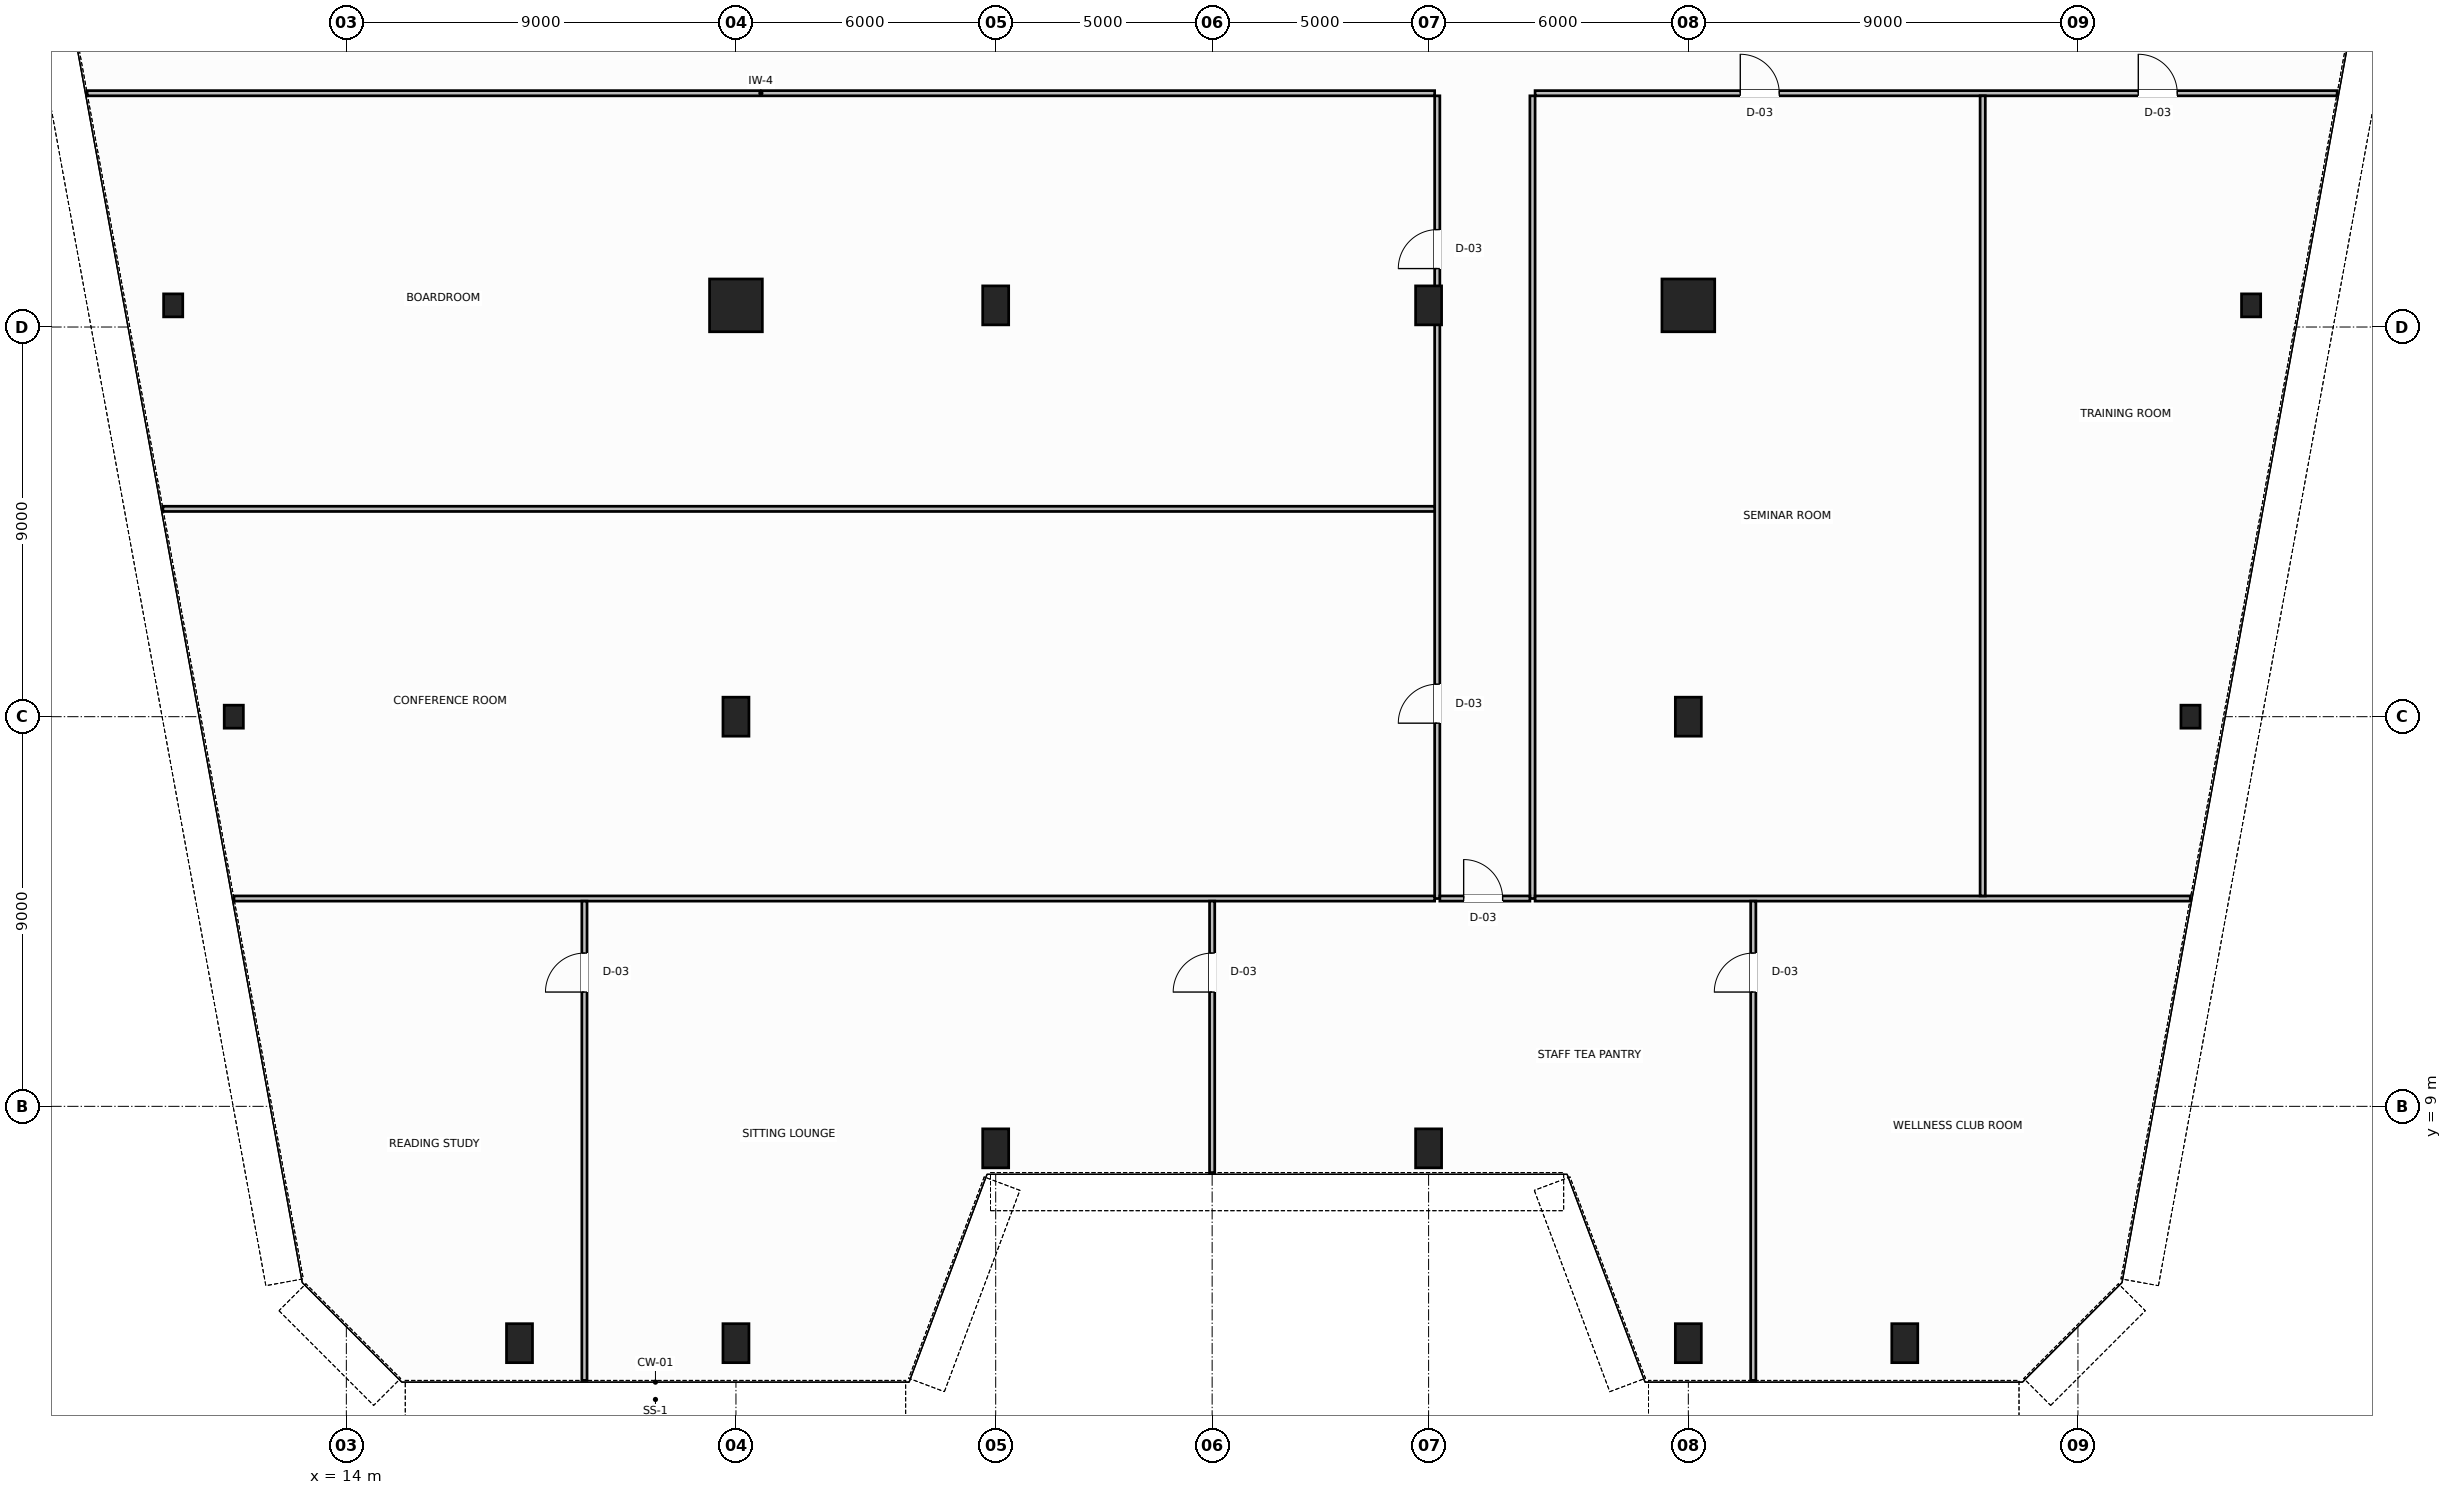
"""IFC4 building model, lengths in metres.
Left out: names, types, materials, properties, quantities, classifications, styles, units other than length and angle.
Written with IfcOpenShell. Run it as: python <this file> out.ifc"""

import sys

from ifc_helpers import new_model, si_unit, direction, frame, frame_2d, origin, origin_2d, place, context, subcontext, project, spatial, rectangle, hollow_rectangle, hollow_circle, i_section, extrude, source, transform, mapped, element, fill, save


model = new_model("IFC4")
c1 = context("Model", 3, precision=1e-05, world=origin(), true_north=direction((0.0, 1.0)))
c2 = subcontext(c1, "Body", "Model", "MODEL_VIEW")
j1 = project(units=[si_unit("LENGTHUNIT", "METRE"), si_unit("PLANEANGLEUNIT", "RADIAN")], contexts=[c1])
p1 = place(None, origin())
s1 = spatial("IfcSite", under=j1, at=p1, CompositionType="ELEMENT")
p2 = place(p1, origin())
s2 = spatial("IfcBuilding", under=s1, at=p2, CompositionType="ELEMENT")
p3 = place(p2, frame((0.0, 0.0, 60.6)))
s3 = spatial("IfcBuildingStorey", under=s2, at=p3, CompositionType="ELEMENT", Elevation=60.6)
m1 = source(origin(), c2, "Body", "SweptSolid", [
    extrude(i_section(OverallWidth=0.442, OverallDepth=0.531, WebThickness=0.065, FlangeThickness=0.076, FilletRadius=0.015, at=origin_2d()), origin(), (0.0, 0.0, 1.0), 3.8),
])
for number, where, z_axis, x_axis in (
    (1, (10.0, 27.5, 0.0), (0.0, 0.0, 1.0), (1.0, 0.0, 0.0)),
    (2, (11.4, 18.0, 0.0), (0.0, 0.0, 1.0), (1.0, 0.0, 0.0)),
    (3, (58.0, 27.5, 0.0), (0.0, 0.0, 1.0), (1.0, 0.0, 0.0)),
    (4, (56.6, 18.0, 0.0), (0.0, 0.0, 1.0), (1.0, 0.0, 0.0)),
):
    element("IfcColumn", number, at=place(p3, frame(where, z_axis=z_axis, x_axis=x_axis)), inside=s3, PredefinedType="COLUMN", context=c2, shape_type="MappedRepresentation", body=[
        mapped(m1, transform((0.0, 0.0, 0.0), scale=1.0)),
    ])
m2 = source(origin(), c2, "Body", "SweptSolid", [
    extrude(hollow_circle(Radius=0.61, WallThickness=0.05, at=origin_2d()), origin(), (0.0, 0.0, 1.0), 3.8),
])
p4 = place(p3, frame((23.0, 27.5, 0.0), z_axis=(0.0, 0.0, 1.0), x_axis=(1.0, 0.0, 0.0)))
e5 = element("IfcColumn", 5, at=p4, inside=s3, PredefinedType="COLUMN", context=c2, shape_type="MappedRepresentation", body=[
    mapped(m2, transform((0.0, 0.0, 0.0), scale=1.0)),
])
m3 = source(origin(), c2, "Body", "SweptSolid", [
    extrude(hollow_rectangle(XDim=0.6, YDim=0.9, WallThickness=0.04, InnerFilletRadius=0.04, OuterFilletRadius=0.08, at=origin_2d()), origin(), (0.0, 0.0, 1.0), 3.8),
])
for number, where, z_axis, x_axis in (
    (6, (29.0, 27.5, 0.0), (0.0, 0.0, 1.0), (1.0, 0.0, 0.0)),
    (7, (39.0, 27.5, 0.0), (0.0, 0.0, 1.0), (1.0, 0.0, 0.0)),
):
    element("IfcColumn", number, at=place(p3, frame(where, z_axis=z_axis, x_axis=x_axis)), inside=s3, PredefinedType="COLUMN", context=c2, shape_type="MappedRepresentation", body=[
        mapped(m3, transform((0.0, 0.0, 0.0), scale=1.0)),
    ])
p5 = place(p3, frame((45.0, 27.5, 0.0), z_axis=(0.0, 0.0, 1.0), x_axis=(1.0, 0.0, 0.0)))
e8 = element("IfcColumn", 8, at=p5, inside=s3, PredefinedType="COLUMN", context=c2, shape_type="MappedRepresentation", body=[
    mapped(m2, transform((0.0, 0.0, 0.0), scale=1.0)),
])
for number, where, z_axis, x_axis in (
    (9, (23.0, 18.0, 0.0), (0.0, 0.0, 1.0), (1.0, 0.0, 0.0)),
    (10, (45.0, 18.0, 0.0), (0.0, 0.0, 1.0), (1.0, 0.0, 0.0)),
):
    element("IfcColumn", number, at=place(p3, frame(where, z_axis=z_axis, x_axis=x_axis)), inside=s3, PredefinedType="COLUMN", context=c2, shape_type="MappedRepresentation", body=[
        mapped(m3, transform((0.0, 0.0, 0.0), scale=1.0)),
    ])
m4 = source(origin(), c2, "Body", "SweptSolid", [
    extrude(hollow_rectangle(XDim=0.6, YDim=0.9, WallThickness=0.04, InnerFilletRadius=0.04, OuterFilletRadius=0.08, at=origin_2d()), origin(), (0.0, 0.0, 1.0), 3.743),
])
for number, where, z_axis, x_axis in (
    (11, (18.0, 3.53, 0.032), (0.0, 0.064, 0.998), (-1.0, 0.0, 0.0)),
    (12, (23.0, 3.53, 0.032), (0.0, 0.064, 0.998), (-1.0, 0.0, 0.0)),
    (13, (29.0, 8.03, 0.032), (0.0, 0.064, 0.998), (-1.0, 0.0, 0.0)),
    (14, (39.0, 8.03, 0.032), (0.0, 0.064, 0.998), (-1.0, 0.0, 0.0)),
    (15, (45.0, 3.53, 0.032), (0.0, 0.064, 0.998), (-1.0, 0.0, 0.0)),
    (16, (50.0, 3.53, 0.032), (0.0, 0.064, 0.998), (-1.0, 0.0, 0.0)),
):
    element("IfcColumn", number, at=place(p3, frame(where, z_axis=z_axis, x_axis=x_axis)), inside=s3, PredefinedType="COLUMN", context=c2, shape_type="MappedRepresentation", body=[
        mapped(m4, transform((0.0, 0.0, 0.0), scale=1.0)),
    ])
p6 = place(p3, frame((8.012, 32.4, 0.0), z_axis=(0.0, 0.0, 1.0), x_axis=(1.0, 0.0, 0.0)))
e17 = element("IfcWall", 17, at=p6, inside=s3, PredefinedType="PARTITIONING", context=c2, shape_type="SweptSolid", body=[
    extrude(rectangle(XDim=31.128, YDim=0.12, at=frame_2d((15.564, 0.0))), origin(), (0.0, 0.0, 1.0), 3.58),
])
p7 = place(p3, frame((41.46, 32.4, 0.0), z_axis=(0.0, 0.0, 1.0), x_axis=(1.0, 0.0, 0.0)))
e18 = element("IfcWall", 18, at=p7, inside=s3, PredefinedType="PARTITIONING", context=c2, shape_type="SweptSolid", body=[
    extrude(rectangle(XDim=18.528, YDim=0.12, at=frame_2d((9.264, 0.0))), origin(), (0.0, 0.0, 1.0), 3.58),
])
p8 = place(p7, frame((4.74, 0.0, 0.0)))
e19 = element("IfcOpeningElement", 19, at=p8, cuts=e18, PredefinedType="OPENING", context=c2, shape_type="SweptSolid", body=[
    extrude(rectangle(XDim=0.9, YDim=2.15, at=frame_2d((0.45, 1.075))), frame((0.0, 0.07, 0.0), z_axis=(0.0, -1.0, 0.0), x_axis=(1.0, 0.0, 0.0)), (0.0, 0.0, 1.0), 0.14),
])
p9 = place(p7, frame((13.934, 0.0, 0.0)))
e20 = element("IfcOpeningElement", 20, at=p9, cuts=e18, PredefinedType="OPENING", context=c2, shape_type="SweptSolid", body=[
    extrude(rectangle(XDim=0.9, YDim=2.15, at=frame_2d((0.45, 1.075))), frame((0.0, 0.07, 0.0), z_axis=(0.0, -1.0, 0.0), x_axis=(1.0, 0.0, 0.0)), (0.0, 0.0, 1.0), 0.14),
])
p10 = place(p3, frame((39.2, 13.8, 0.0), z_axis=(0.0, 0.0, 1.0), x_axis=(0.0, 1.0, 0.0)))
e21 = element("IfcWall", 21, at=p10, inside=s3, PredefinedType="PARTITIONING", context=c2, shape_type="SweptSolid", body=[
    extrude(rectangle(XDim=18.54, YDim=0.12, at=frame_2d((9.27, 0.0))), origin(), (0.0, 0.0, 1.0), 2.77),
])
p11 = place(p10, frame((4.05, 0.0, 0.0)))
e22 = element("IfcOpeningElement", 22, at=p11, cuts=e21, PredefinedType="OPENING", context=c2, shape_type="SweptSolid", body=[
    extrude(rectangle(XDim=0.9, YDim=2.15, at=frame_2d((0.45, 1.075))), frame((0.0, 0.07, 0.0), z_axis=(0.0, -1.0, 0.0), x_axis=(1.0, 0.0, 0.0)), (0.0, 0.0, 1.0), 0.14),
])
p12 = place(p10, frame((14.55, 0.0, 0.0)))
e23 = element("IfcOpeningElement", 23, at=p12, cuts=e21, PredefinedType="OPENING", context=c2, shape_type="SweptSolid", body=[
    extrude(rectangle(XDim=0.9, YDim=2.15, at=frame_2d((0.45, 1.075))), frame((0.0, 0.07, 0.0), z_axis=(0.0, -1.0, 0.0), x_axis=(1.0, 0.0, 0.0)), (0.0, 0.0, 1.0), 0.14),
])
p13 = place(p3, frame((41.4, 13.8, 0.0), z_axis=(0.0, 0.0, 1.0), x_axis=(0.0, 1.0, 0.0)))
e24 = element("IfcWall", 24, at=p13, inside=s3, PredefinedType="PARTITIONING", context=c2, shape_type="SweptSolid", body=[
    extrude(rectangle(XDim=18.54, YDim=0.12, at=frame_2d((9.27, 0.0))), origin(), (0.0, 0.0, 1.0), 3.58),
])
p14 = place(p3, frame((39.26, 13.8, 0.0), z_axis=(0.0, 0.0, 1.0), x_axis=(1.0, 0.0, 0.0)))
e25 = element("IfcWall", 25, at=p14, inside=s3, PredefinedType="PARTITIONING", context=c2, shape_type="SweptSolid", body=[
    extrude(rectangle(XDim=2.08, YDim=0.12, at=frame_2d((1.04, 0.0))), origin(), (0.0, 0.0, 1.0), 3.58),
])
p15 = place(p14, frame((0.55, 0.0, 0.0)))
e26 = element("IfcOpeningElement", 26, at=p15, cuts=e25, PredefinedType="OPENING", context=c2, shape_type="SweptSolid", body=[
    extrude(rectangle(XDim=0.9, YDim=2.15, at=frame_2d((0.45, 1.075))), frame((0.0, 0.07, 0.0), z_axis=(0.0, -1.0, 0.0), x_axis=(1.0, 0.0, 0.0)), (0.0, 0.0, 1.0), 0.14),
])
p16 = place(p3, frame((11.404, 13.8, 0.0), z_axis=(0.0, 0.0, 1.0), x_axis=(1.0, 0.0, 0.0)))
e27 = element("IfcWall", 27, at=p16, inside=s3, PredefinedType="PARTITIONING", context=c2, shape_type="SweptSolid", body=[
    extrude(rectangle(XDim=27.736, YDim=0.12, at=frame_2d((13.868, 0.0))), origin(), (0.0, 0.0, 1.0), 3.58),
])
p17 = place(p3, frame((41.46, 13.8, 0.0), z_axis=(0.0, 0.0, 1.0), x_axis=(1.0, 0.0, 0.0)))
e28 = element("IfcWall", 28, at=p17, inside=s3, PredefinedType="PARTITIONING", context=c2, shape_type="SweptSolid", body=[
    extrude(rectangle(XDim=15.136, YDim=0.12, at=frame_2d((7.568, 0.0))), origin(), (0.0, 0.0, 1.0), 3.58),
])
p18 = place(p3, frame((19.5, 2.67, 0.0), z_axis=(0.0, 0.0, 1.0), x_axis=(0.0, 1.0, 0.0)))
e29 = element("IfcWall", 29, at=p18, inside=s3, PredefinedType="PARTITIONING", context=c2, shape_type="SweptSolid", body=[
    extrude(rectangle(XDim=11.07, YDim=0.12, at=frame_2d((5.535, 0.0))), origin(), (0.0, 0.0, 1.0), 3.58),
])
p19 = place(p18, frame((8.97, 0.0, 0.0)))
e30 = element("IfcOpeningElement", 30, at=p19, cuts=e29, PredefinedType="OPENING", context=c2, shape_type="SweptSolid", body=[
    extrude(rectangle(XDim=0.9, YDim=2.15, at=frame_2d((0.45, 1.075))), frame((0.0, 0.07, 0.0), z_axis=(0.0, -1.0, 0.0), x_axis=(1.0, 0.0, 0.0)), (0.0, 0.0, 1.0), 0.14),
])
p20 = place(p3, frame((34.0, 7.47, 0.0), z_axis=(0.0, 0.0, 1.0), x_axis=(0.0, 1.0, 0.0)))
e31 = element("IfcWall", 31, at=p20, inside=s3, PredefinedType="PARTITIONING", context=c2, shape_type="SweptSolid", body=[
    extrude(rectangle(XDim=6.27, YDim=0.12, at=frame_2d((3.135, 0.0))), origin(), (0.0, 0.0, 1.0), 3.58),
])
p21 = place(p20, frame((4.17, 0.0, 0.0)))
e32 = element("IfcOpeningElement", 32, at=p21, cuts=e31, PredefinedType="OPENING", context=c2, shape_type="SweptSolid", body=[
    extrude(rectangle(XDim=0.9, YDim=2.15, at=frame_2d((0.45, 1.075))), frame((0.0, 0.07, 0.0), z_axis=(0.0, -1.0, 0.0), x_axis=(1.0, 0.0, 0.0)), (0.0, 0.0, 1.0), 0.14),
])
p22 = place(p3, frame((46.5, 2.67, 0.0), z_axis=(0.0, 0.0, 1.0), x_axis=(0.0, 1.0, 0.0)))
e33 = element("IfcWall", 33, at=p22, inside=s3, PredefinedType="PARTITIONING", context=c2, shape_type="SweptSolid", body=[
    extrude(rectangle(XDim=11.07, YDim=0.12, at=frame_2d((5.535, 0.0))), origin(), (0.0, 0.0, 1.0), 3.58),
])
p23 = place(p22, frame((8.97, 0.0, 0.0)))
e34 = element("IfcOpeningElement", 34, at=p23, cuts=e33, PredefinedType="OPENING", context=c2, shape_type="SweptSolid", body=[
    extrude(rectangle(XDim=0.9, YDim=2.15, at=frame_2d((0.45, 1.075))), frame((0.0, 0.07, 0.0), z_axis=(0.0, -1.0, 0.0), x_axis=(1.0, 0.0, 0.0)), (0.0, 0.0, 1.0), 0.14),
])
p24 = place(p3, frame((9.763, 22.8, 0.0), z_axis=(0.0, 0.0, 1.0), x_axis=(1.0, 0.0, 0.0)))
e35 = element("IfcWall", 35, at=p24, inside=s3, PredefinedType="PARTITIONING", context=c2, shape_type="SweptSolid", body=[
    extrude(rectangle(XDim=29.377, YDim=0.12, at=frame_2d((14.688, 0.0))), origin(), (0.0, 0.0, 1.0), 3.58),
])
p25 = place(p3, frame((51.8, 13.86, 0.0), z_axis=(0.0, 0.0, 1.0), x_axis=(0.0, 1.0, 0.0)))
e36 = element("IfcWall", 36, at=p25, inside=s3, PredefinedType="PARTITIONING", context=c2, shape_type="SweptSolid", body=[
    extrude(rectangle(XDim=18.48, YDim=0.12, at=frame_2d((9.24, 0.0))), origin(), (0.0, 0.0, 1.0), 3.58),
])
m5 = source(origin(), c2, "Body", "SweptSolid", [
    extrude(rectangle(XDim=0.9, YDim=2.15, at=frame_2d((0.45, 1.075))), frame((0.0, 0.025, 0.0), z_axis=(0.0, -1.0, 0.0), x_axis=(1.0, 0.0, 0.0)), (0.0, 0.0, 1.0), 0.05),
])
p26 = place(p19, origin())
e37 = element("IfcDoor", 37, at=p26, inside=s3, OperationType="SINGLE_SWING_RIGHT", PredefinedType="DOOR", context=c2, shape_type="MappedRepresentation", body=[
    mapped(m5, transform((0.0, 0.0, 0.0), scale=1.0)),
])
fill(e30, e37)
p27 = place(p21, origin())
e38 = element("IfcDoor", 38, at=p27, inside=s3, OperationType="SINGLE_SWING_LEFT", PredefinedType="DOOR", context=c2, shape_type="MappedRepresentation", body=[
    mapped(m5, transform((0.0, 0.0, 0.0), scale=1.0)),
])
fill(e32, e38)
p28 = place(p15, origin())
e39 = element("IfcDoor", 39, at=p28, inside=s3, OperationType="SINGLE_SWING_LEFT", PredefinedType="DOOR", context=c2, shape_type="MappedRepresentation", body=[
    mapped(m5, transform((0.0, 0.0, 0.0), scale=1.0)),
])
fill(e26, e39)
p29 = place(p23, origin())
e40 = element("IfcDoor", 40, at=p29, inside=s3, OperationType="SINGLE_SWING_RIGHT", PredefinedType="DOOR", context=c2, shape_type="MappedRepresentation", body=[
    mapped(m5, transform((0.0, 0.0, 0.0), scale=1.0)),
])
fill(e34, e40)
p30 = place(p11, origin())
e41 = element("IfcDoor", 41, at=p30, inside=s3, OperationType="SINGLE_SWING_LEFT", PredefinedType="DOOR", context=c2, shape_type="MappedRepresentation", body=[
    mapped(m5, transform((0.0, 0.0, 0.0), scale=1.0)),
])
fill(e22, e41)
p31 = place(p12, origin())
e42 = element("IfcDoor", 42, at=p31, inside=s3, OperationType="SINGLE_SWING_RIGHT", PredefinedType="DOOR", context=c2, shape_type="MappedRepresentation", body=[
    mapped(m5, transform((0.0, 0.0, 0.0), scale=1.0)),
])
fill(e23, e42)
p32 = place(p8, origin())
e43 = element("IfcDoor", 43, at=p32, inside=s3, OperationType="SINGLE_SWING_RIGHT", PredefinedType="DOOR", context=c2, shape_type="MappedRepresentation", body=[
    mapped(m5, transform((0.0, 0.0, 0.0), scale=1.0)),
])
fill(e19, e43)
p33 = place(p9, origin())
e44 = element("IfcDoor", 44, at=p33, inside=s3, OperationType="SINGLE_SWING_LEFT", PredefinedType="DOOR", context=c2, shape_type="MappedRepresentation", body=[
    mapped(m5, transform((0.0, 0.0, 0.0), scale=1.0)),
])
fill(e20, e44)
save(model, sys.argv[1])
